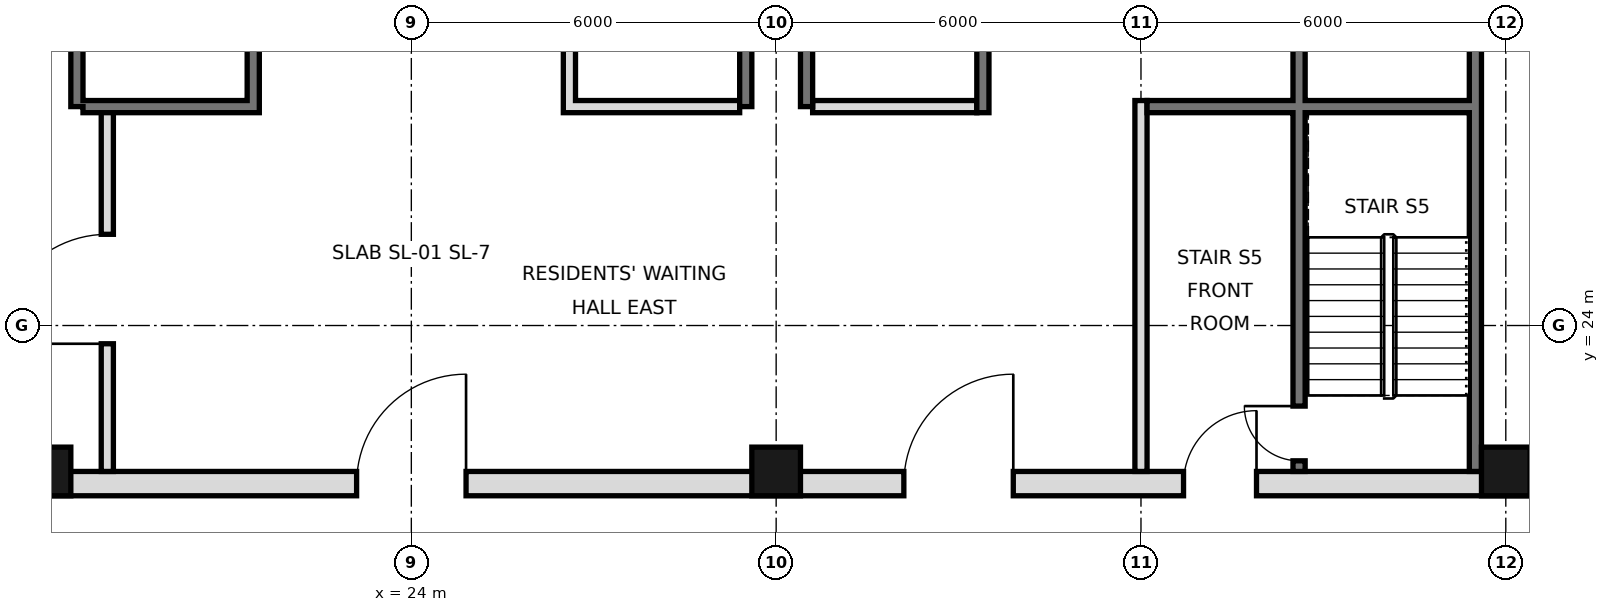
"""IFC4 building model, lengths in metres.
Left out: names, types, materials, properties, quantities, classifications, styles, units other than length and angle.
Written with IfcOpenShell. Run it as: python <this file> out.ifc"""

import sys

from ifc_helpers import new_model, si_unit, direction, frame, frame_2d, origin, origin_2d, place, context, subcontext, project, spatial, rectangle, hollow_rectangle, extrude, element, fill, save


model = new_model("IFC4")
c1 = context("Model", 3, precision=1e-05, world=origin(), true_north=direction((0.0, 1.0)))
c2 = subcontext(c1, "Body", "Model", "MODEL_VIEW")
j1 = project(units=[si_unit("LENGTHUNIT", "METRE"), si_unit("PLANEANGLEUNIT", "RADIAN")], contexts=[c1])
p1 = place(None, origin())
s1 = spatial("IfcSite", under=j1, at=p1, CompositionType="ELEMENT")
p2 = place(p1, origin())
s2 = spatial("IfcBuilding", under=s1, at=p2, CompositionType="ELEMENT")
p3 = place(p2, frame((0.0, 0.0, 99.8)))
s3 = spatial("IfcBuildingStorey", under=s2, at=p3, CompositionType="ELEMENT", Elevation=99.8)
for number, where, z_axis, x_axis in (
    (1, (18.0, 21.6, 0.0), (0.0, 0.0, 1.0), (1.0, 0.0, 0.0)),
    (2, (30.0, 21.6, 0.0), (0.0, 0.0, 1.0), (1.0, 0.0, 0.0)),
    (3, (42.0, 21.6, 0.0), (0.0, 0.0, 1.0), (1.0, 0.0, 0.0)),
):
    element("IfcColumn", number, at=place(p3, frame(where, z_axis=z_axis, x_axis=x_axis)), inside=s3, PredefinedType="COLUMN", context=c2, shape_type="SweptSolid", body=[
        extrude(hollow_rectangle(XDim=0.8, YDim=0.8, WallThickness=0.05, at=origin_2d()), origin(), (0.0, 0.0, 1.0), 3.6),
    ])
p4 = place(p3, frame((41.5, 21.6, 0.0), z_axis=(0.0, 0.0, 1.0), x_axis=(0.0, 1.0, 0.0)))
e4 = element("IfcWall", 4, at=p4, inside=s3, PredefinedType="SOLIDWALL", context=c2, shape_type="SweptSolid", body=[
    extrude(rectangle(XDim=23.5, YDim=0.2, at=frame_2d((11.75, 0.0))), origin(), (0.0, 0.0, 1.0), 3.42),
])
for number, where, z_axis, x_axis in (
    (5, (18.5, 27.6, 0.0), (0.0, 0.0, 1.0), (0.0, 1.0, 0.0)),
    (6, (29.5, 27.6, 0.0), (0.0, 0.0, 1.0), (0.0, 1.0, 0.0)),
    (7, (30.5, 27.6, 0.0), (0.0, 0.0, 1.0), (0.0, 1.0, 0.0)),
):
    element("IfcWall", number, at=place(p3, frame(where, z_axis=z_axis, x_axis=x_axis)), inside=s3, PredefinedType="SOLIDWALL", context=c2, shape_type="SweptSolid", body=[
        extrude(rectangle(XDim=17.5, YDim=0.2, at=frame_2d((8.75, 0.0))), origin(), (0.0, 0.0, 1.0), 3.42),
    ])
p5 = place(p3, frame((5.6, 21.4, 0.0), z_axis=(0.0, 0.0, 1.0), x_axis=(1.0, 0.0, 0.0)))
e8 = element("IfcWall", 8, at=p5, inside=s3, PredefinedType="SOLIDWALL", context=c2, shape_type="SweptSolid", body=[
    extrude(rectangle(XDim=36.8, YDim=0.4, at=frame_2d((18.4, 0.0))), origin(), (0.0, 0.0, 1.0), 3.42),
])
p6 = place(p5, frame((8.5, 0.0, 0.0)))
e9 = element("IfcOpeningElement", 9, at=p6, cuts=e8, PredefinedType="OPENING", context=c2, shape_type="SweptSolid", body=[
    extrude(rectangle(XDim=1.8, YDim=2.1, at=frame_2d((0.9, 1.05))), frame((0.0, 0.21, 0.0), z_axis=(0.0, -1.0, 0.0), x_axis=(1.0, 0.0, 0.0)), (0.0, 0.0, 1.0), 0.42),
])
p7 = place(p5, frame((17.5, 0.0, 0.0)))
e10 = element("IfcOpeningElement", 10, at=p7, cuts=e8, PredefinedType="OPENING", context=c2, shape_type="SweptSolid", body=[
    extrude(rectangle(XDim=1.8, YDim=2.1, at=frame_2d((0.9, 1.05))), frame((0.0, 0.21, 0.0), z_axis=(0.0, -1.0, 0.0), x_axis=(1.0, 0.0, 0.0)), (0.0, 0.0, 1.0), 0.42),
])
p8 = place(p5, frame((26.5, 0.0, 0.0)))
e11 = element("IfcOpeningElement", 11, at=p8, cuts=e8, PredefinedType="OPENING", context=c2, shape_type="SweptSolid", body=[
    extrude(rectangle(XDim=1.8, YDim=2.1, at=frame_2d((0.9, 1.05))), frame((0.0, 0.21, 0.0), z_axis=(0.0, -1.0, 0.0), x_axis=(1.0, 0.0, 0.0)), (0.0, 0.0, 1.0), 0.42),
])
p9 = place(p5, frame((4.5, 0.0, 0.0)))
e12 = element("IfcOpeningElement", 12, at=p9, cuts=e8, PredefinedType="OPENING", context=c2, shape_type="SweptSolid", body=[
    extrude(rectangle(XDim=1.2, YDim=2.1, at=frame_2d((0.6, 1.05))), frame((0.0, 0.21, 0.0), z_axis=(0.0, -1.0, 0.0), x_axis=(1.0, 0.0, 0.0)), (0.0, 0.0, 1.0), 0.42),
])
p10 = place(p5, frame((31.1, 0.0, 0.0)))
e13 = element("IfcOpeningElement", 13, at=p10, cuts=e8, PredefinedType="OPENING", context=c2, shape_type="SweptSolid", body=[
    extrude(rectangle(XDim=1.2, YDim=2.1, at=frame_2d((0.6, 1.05))), frame((0.0, 0.21, 0.0), z_axis=(0.0, -1.0, 0.0), x_axis=(1.0, 0.0, 0.0)), (0.0, 0.0, 1.0), 0.42),
])
p11 = place(p3, frame((19.0, 21.6, 0.0), z_axis=(0.0, 0.0, 1.0), x_axis=(0.0, 1.0, 0.0)))
e14 = element("IfcWall", 14, at=p11, inside=s3, PredefinedType="PARTITIONING", context=c2, shape_type="SweptSolid", body=[
    extrude(rectangle(XDim=6.0, YDim=0.2, at=frame_2d((3.0, 0.0))), origin(), (0.0, 0.0, 1.0), 3.42),
])
p12 = place(p11, frame((2.1, 0.0, 0.0)))
e15 = element("IfcOpeningElement", 15, at=p12, cuts=e14, PredefinedType="OPENING", context=c2, shape_type="SweptSolid", body=[
    extrude(rectangle(XDim=1.8, YDim=2.1, at=frame_2d((0.9, 1.05))), frame((0.0, 0.11, 0.0), z_axis=(0.0, -1.0, 0.0), x_axis=(1.0, 0.0, 0.0)), (0.0, 0.0, 1.0), 0.22),
])
p13 = place(p3, frame((21.4, 27.5, 0.0), z_axis=(0.0, 0.0, 1.0), x_axis=(0.0, 1.0, 0.0)))
e16 = element("IfcWall", 16, at=p13, inside=s3, PredefinedType="SOLIDWALL", context=c2, shape_type="SweptSolid", body=[
    extrude(rectangle(XDim=17.5, YDim=0.2, at=frame_2d((8.75, 0.0))), origin(), (0.0, 0.0, 1.0), 3.42),
])
p14 = place(p13, frame((16.2, 0.0, 0.0)))
e17 = element("IfcOpeningElement", 17, at=p14, cuts=e16, PredefinedType="OPENING", context=c2, shape_type="SweptSolid", body=[
    extrude(rectangle(XDim=1.0, YDim=2.1, at=frame_2d((0.5, 1.05))), frame((0.0, 0.11, 0.0), z_axis=(0.0, -1.0, 0.0), x_axis=(1.0, 0.0, 0.0)), (0.0, 0.0, 1.0), 0.22),
])
p15 = place(p13, frame((7.4, 0.0, 0.0)))
e18 = element("IfcOpeningElement", 18, at=p15, cuts=e16, PredefinedType="OPENING", context=c2, shape_type="SweptSolid", body=[
    extrude(rectangle(XDim=0.9, YDim=2.1, at=frame_2d((0.45, 1.05))), frame((0.0, 0.11, 0.0), z_axis=(0.0, -1.0, 0.0), x_axis=(1.0, 0.0, 0.0)), (0.0, 0.0, 1.0), 0.22),
])
p16 = place(p3, frame((26.6, 27.5, 0.0), z_axis=(0.0, 0.0, 1.0), x_axis=(0.0, 1.0, 0.0)))
e19 = element("IfcWall", 19, at=p16, inside=s3, PredefinedType="SOLIDWALL", context=c2, shape_type="SweptSolid", body=[
    extrude(rectangle(XDim=17.5, YDim=0.2, at=frame_2d((8.75, 0.0))), origin(), (0.0, 0.0, 1.0), 3.42),
])
p17 = place(p16, frame((4.3, 0.0, 0.0)))
e20 = element("IfcOpeningElement", 20, at=p17, cuts=e19, PredefinedType="OPENING", context=c2, shape_type="SweptSolid", body=[
    extrude(rectangle(XDim=0.9, YDim=2.1, at=frame_2d((0.45, 1.05))), frame((0.0, 0.11, 0.0), z_axis=(0.0, -1.0, 0.0), x_axis=(1.0, 0.0, 0.0)), (0.0, 0.0, 1.0), 0.22),
])
p18 = place(p16, frame((10.35, 0.0, 0.0)))
e21 = element("IfcOpeningElement", 21, at=p18, cuts=e19, PredefinedType="OPENING", context=c2, shape_type="SweptSolid", body=[
    extrude(rectangle(XDim=1.0, YDim=2.1, at=frame_2d((0.5, 1.05))), frame((0.0, 0.11, 0.0), z_axis=(0.0, -1.0, 0.0), x_axis=(1.0, 0.0, 0.0)), (0.0, 0.0, 1.0), 0.22),
])
p19 = place(p3, frame((33.4, 27.5, 0.0), z_axis=(0.0, 0.0, 1.0), x_axis=(0.0, 1.0, 0.0)))
e22 = element("IfcWall", 22, at=p19, inside=s3, PredefinedType="SOLIDWALL", context=c2, shape_type="SweptSolid", body=[
    extrude(rectangle(XDim=17.5, YDim=0.2, at=frame_2d((8.75, 0.0))), origin(), (0.0, 0.0, 1.0), 3.42),
])
p20 = place(p19, frame((15.4, 0.0, 0.0)))
e23 = element("IfcOpeningElement", 23, at=p20, cuts=e22, PredefinedType="OPENING", context=c2, shape_type="SweptSolid", body=[
    extrude(rectangle(XDim=1.1, YDim=2.1, at=frame_2d((0.55, 1.05))), frame((0.0, 0.11, 0.0), z_axis=(0.0, -1.0, 0.0), x_axis=(1.0, 0.0, 0.0)), (0.0, 0.0, 1.0), 0.22),
])
p21 = place(p19, frame((2.7, 0.0, 0.0)))
e24 = element("IfcOpeningElement", 24, at=p21, cuts=e22, PredefinedType="OPENING", context=c2, shape_type="SweptSolid", body=[
    extrude(rectangle(XDim=1.0, YDim=2.1, at=frame_2d((0.5, 1.05))), frame((0.0, 0.11, 0.0), z_axis=(0.0, -1.0, 0.0), x_axis=(1.0, 0.0, 0.0)), (0.0, 0.0, 1.0), 0.22),
])
p22 = place(p19, frame((9.9, 0.0, 0.0)))
e25 = element("IfcOpeningElement", 25, at=p22, cuts=e22, PredefinedType="OPENING", context=c2, shape_type="SweptSolid", body=[
    extrude(rectangle(XDim=0.9, YDim=2.1, at=frame_2d((0.45, 1.05))), frame((0.0, 0.11, 0.0), z_axis=(0.0, -1.0, 0.0), x_axis=(1.0, 0.0, 0.0)), (0.0, 0.0, 1.0), 0.22),
])
p23 = place(p3, frame((36.0, 21.6, 0.0), z_axis=(0.0, 0.0, 1.0), x_axis=(0.0, 1.0, 0.0)))
e26 = element("IfcWall", 26, at=p23, inside=s3, PredefinedType="PARTITIONING", context=c2, shape_type="SweptSolid", body=[
    extrude(rectangle(XDim=6.1, YDim=0.2, at=frame_2d((3.05, 0.0))), origin(), (0.0, 0.0, 1.0), 3.42),
])
p24 = place(p3, frame((38.6, 21.6, 0.0), z_axis=(0.0, 0.0, 1.0), x_axis=(0.0, 1.0, 0.0)))
e27 = element("IfcWall", 27, at=p24, inside=s3, PredefinedType="SOLIDWALL", context=c2, shape_type="SweptSolid", body=[
    extrude(rectangle(XDim=23.4, YDim=0.2, at=frame_2d((11.7, 0.0))), origin(), (0.0, 0.0, 1.0), 3.42),
])
p25 = place(p24, frame((8.6, 0.0, 0.0)))
e28 = element("IfcOpeningElement", 28, at=p25, cuts=e27, PredefinedType="OPENING", context=c2, shape_type="SweptSolid", body=[
    extrude(rectangle(XDim=1.0, YDim=2.1, at=frame_2d((0.5, 1.05))), frame((0.0, 0.11, 0.0), z_axis=(0.0, -1.0, 0.0), x_axis=(1.0, 0.0, 0.0)), (0.0, 0.0, 1.0), 0.22),
])
p26 = place(p24, frame((13.25, 0.0, 0.0)))
e29 = element("IfcOpeningElement", 29, at=p26, cuts=e27, PredefinedType="OPENING", context=c2, shape_type="SweptSolid", body=[
    extrude(rectangle(XDim=1.0, YDim=2.1, at=frame_2d((0.5, 1.05))), frame((0.0, 0.11, 0.0), z_axis=(0.0, -1.0, 0.0), x_axis=(1.0, 0.0, 0.0)), (0.0, 0.0, 1.0), 0.22),
])
p27 = place(p24, frame((22.1, 0.0, 0.0)))
e30 = element("IfcOpeningElement", 30, at=p27, cuts=e27, PredefinedType="OPENING", context=c2, shape_type="SweptSolid", body=[
    extrude(rectangle(XDim=1.0, YDim=2.1, at=frame_2d((0.5, 1.05))), frame((0.0, 0.11, 0.0), z_axis=(0.0, -1.0, 0.0), x_axis=(1.0, 0.0, 0.0)), (0.0, 0.0, 1.0), 0.22),
])
p28 = place(p24, frame((0.175, 0.0, 0.0)))
e31 = element("IfcOpeningElement", 31, at=p28, cuts=e27, PredefinedType="OPENING", context=c2, shape_type="SweptSolid", body=[
    extrude(rectangle(XDim=0.9, YDim=2.1, at=frame_2d((0.45, 1.05))), frame((0.0, 0.11, 0.0), z_axis=(0.0, -1.0, 0.0), x_axis=(1.0, 0.0, 0.0)), (0.0, 0.0, 1.0), 0.22),
])
for number, where, z_axis, x_axis in (
    (32, (18.6, 27.6, 0.0), (0.0, 0.0, 1.0), (1.0, 0.0, 0.0)),
    (33, (26.7, 27.6, 0.0), (0.0, 0.0, 1.0), (1.0, 0.0, 0.0)),
):
    element("IfcWall", number, at=place(p3, frame(where, z_axis=z_axis, x_axis=x_axis)), inside=s3, PredefinedType="SOLIDWALL", context=c2, shape_type="SweptSolid", body=[
        extrude(rectangle(XDim=2.7, YDim=0.2, at=frame_2d((1.35, 0.0))), origin(), (0.0, 0.0, 1.0), 3.42),
    ])
p29 = place(p3, frame((30.6, 27.6, 0.0), z_axis=(0.0, 0.0, 1.0), x_axis=(1.0, 0.0, 0.0)))
e34 = element("IfcWall", 34, at=p29, inside=s3, PredefinedType="PARTITIONING", context=c2, shape_type="SweptSolid", body=[
    extrude(rectangle(XDim=2.7, YDim=0.2, at=frame_2d((1.35, 0.0))), origin(), (0.0, 0.0, 1.0), 3.42),
])
p30 = place(p3, frame((36.1, 27.6, 0.0), z_axis=(0.0, 0.0, 1.0), x_axis=(1.0, 0.0, 0.0)))
e35 = element("IfcWall", 35, at=p30, inside=s3, PredefinedType="SOLIDWALL", context=c2, shape_type="SweptSolid", body=[
    extrude(rectangle(XDim=5.3, YDim=0.2, at=frame_2d((2.65, 0.0))), origin(), (0.0, 0.0, 1.0), 3.42),
])
p31 = place(p12, origin())
e36 = element("IfcDoor", 36, at=p31, inside=s3, OperationType="SINGLE_SWING_LEFT", PredefinedType="DOOR", context=c2, shape_type="SweptSolid", body=[
    extrude(rectangle(XDim=1.8, YDim=2.1, at=frame_2d((0.9, 1.05))), frame((0.0, 0.025, 0.0), z_axis=(0.0, -1.0, 0.0), x_axis=(1.0, 0.0, 0.0)), (0.0, 0.0, 1.0), 0.05),
])
fill(e15, e36)
p32 = place(p7, frame((1.8, 0.0, 0.0), z_axis=(0.0, 0.0, 1.0), x_axis=(-1.0, 0.0, 0.0)))
e37 = element("IfcDoor", 37, at=p32, inside=s3, OperationType="SINGLE_SWING_LEFT", PredefinedType="DOOR", context=c2, shape_type="SweptSolid", body=[
    extrude(rectangle(XDim=1.8, YDim=2.1, at=frame_2d((0.9, 1.05))), frame((0.0, 0.025, 0.0), z_axis=(0.0, -1.0, 0.0), x_axis=(1.0, 0.0, 0.0)), (0.0, 0.0, 1.0), 0.05),
])
fill(e10, e37)
p33 = place(p8, frame((1.8, 0.0, 0.0), z_axis=(0.0, 0.0, 1.0), x_axis=(-1.0, 0.0, 0.0)))
e38 = element("IfcDoor", 38, at=p33, inside=s3, OperationType="SINGLE_SWING_LEFT", PredefinedType="DOOR", context=c2, shape_type="SweptSolid", body=[
    extrude(rectangle(XDim=1.8, YDim=2.1, at=frame_2d((0.9, 1.05))), frame((0.0, 0.025, 0.0), z_axis=(0.0, -1.0, 0.0), x_axis=(1.0, 0.0, 0.0)), (0.0, 0.0, 1.0), 0.05),
])
fill(e11, e38)
p34 = place(p10, frame((1.2, 0.0, 0.0), z_axis=(0.0, 0.0, 1.0), x_axis=(-1.0, 0.0, 0.0)))
e39 = element("IfcDoor", 39, at=p34, inside=s3, OperationType="SINGLE_SWING_LEFT", PredefinedType="DOOR", context=c2, shape_type="SweptSolid", body=[
    extrude(rectangle(XDim=1.2, YDim=2.1, at=frame_2d((0.6, 1.05))), frame((0.0, 0.025, 0.0), z_axis=(0.0, -1.0, 0.0), x_axis=(1.0, 0.0, 0.0)), (0.0, 0.0, 1.0), 0.05),
])
fill(e13, e39)
p35 = place(p28, frame((0.9, 0.0, 0.0), z_axis=(0.0, 0.0, 1.0), x_axis=(-1.0, 0.0, 0.0)))
e40 = element("IfcDoor", 40, at=p35, inside=s3, OperationType="SINGLE_SWING_LEFT", PredefinedType="DOOR", context=c2, shape_type="SweptSolid", body=[
    extrude(rectangle(XDim=0.9, YDim=2.1, at=frame_2d((0.45, 1.05))), frame((0.0, 0.025, 0.0), z_axis=(0.0, -1.0, 0.0), x_axis=(1.0, 0.0, 0.0)), (0.0, 0.0, 1.0), 0.05),
])
fill(e31, e40)
save(model, sys.argv[1])
